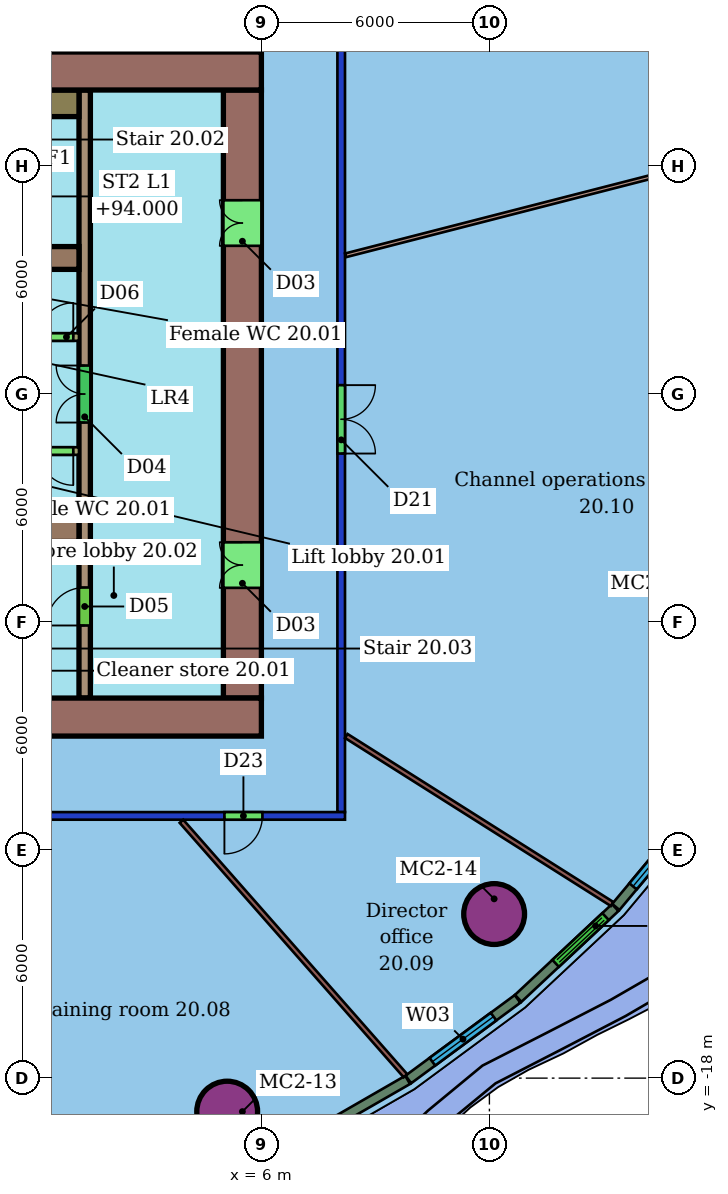
"""IFC4 building model, lengths in metres.
Left out: names, types, materials, properties, quantities, classifications, styles, units other than length and angle.
Written with IfcOpenShell. Run it as: python <this file> out.ifc"""

import sys

from ifc_helpers import new_model, si_unit, direction, frame, frame_2d, origin, origin_2d, place, context, subcontext, project, spatial, rectangle, hollow_circle, extrude, element, fill, save


model = new_model("IFC4")
c1 = context("Model", 3, precision=1e-05, world=origin(), true_north=direction((0.0, 1.0)))
c2 = subcontext(c1, "Body", "Model", "MODEL_VIEW")
j1 = project(units=[si_unit("LENGTHUNIT", "METRE"), si_unit("PLANEANGLEUNIT", "RADIAN")], contexts=[c1])
p1 = place(None, origin())
s1 = spatial("IfcSite", under=j1, at=p1, CompositionType="ELEMENT")
p2 = place(p1, origin())
s2 = spatial("IfcBuilding", under=s1, at=p2, CompositionType="ELEMENT")
p3 = place(p2, frame((0.0, 0.0, 92.2)))
s3 = spatial("IfcBuildingStorey", under=s2, at=p3, CompositionType="ELEMENT", Elevation=92.2)
for number, where, z_axis, x_axis in (
    (1, (5.1, -18.881, 0.0), (0.0, 0.0, 1.0), (1.0, 0.0, 0.0)),
    (2, (12.125, -13.683, 0.0), (0.0, 0.0, 1.0), (1.0, 0.0, 0.0)),
):
    element("IfcColumn", number, at=place(p3, frame(where, z_axis=z_axis, x_axis=x_axis)), inside=s3, PredefinedType="COLUMN", context=c2, shape_type="SweptSolid", body=[
        extrude(hollow_circle(Radius=0.8, WallThickness=0.055, at=origin_2d()), origin(), (0.0, 0.0, 1.0), 3.45),
    ])
p4 = place(p3, frame((8.2, -11.1, 0.0), z_axis=(0.0, 0.0, 1.0), x_axis=(-1.0, 0.0, 0.0)))
e3 = element("IfcWall", 3, at=p4, inside=s3, PredefinedType="PARTITIONING", context=c2, shape_type="SweptSolid", body=[
    extrude(rectangle(XDim=28.4, YDim=0.2, at=frame_2d((14.2, 0.0))), origin(), (0.0, 0.0, 1.0), 3.0),
])
p5 = place(p4, frame((22.418, 0.0, 0.0)))
e4 = element("IfcOpeningElement", 4, at=p5, cuts=e3, PredefinedType="OPENING", context=c2, shape_type="SweptSolid", body=[
    extrude(rectangle(XDim=1.8, YDim=2.1, at=frame_2d((0.9, 1.05))), frame((0.0, 0.11, 0.0), z_axis=(0.0, -1.0, 0.0), x_axis=(1.0, 0.0, 0.0)), (0.0, 0.0, 1.0), 0.22),
])
p6 = place(p4, frame((16.796, 0.0, 0.0)))
e5 = element("IfcOpeningElement", 5, at=p6, cuts=e3, PredefinedType="OPENING", context=c2, shape_type="SweptSolid", body=[
    extrude(rectangle(XDim=1.0, YDim=2.1, at=frame_2d((0.5, 1.05))), frame((0.0, 0.11, 0.0), z_axis=(0.0, -1.0, 0.0), x_axis=(1.0, 0.0, 0.0)), (0.0, 0.0, 1.0), 0.22),
])
p7 = place(p4, frame((8.009, 0.0, 0.0)))
e6 = element("IfcOpeningElement", 6, at=p7, cuts=e3, PredefinedType="OPENING", context=c2, shape_type="SweptSolid", body=[
    extrude(rectangle(XDim=1.5, YDim=2.1, at=frame_2d((0.75, 1.05))), frame((0.0, 0.11, 0.0), z_axis=(0.0, -1.0, 0.0), x_axis=(1.0, 0.0, 0.0)), (0.0, 0.0, 1.0), 0.22),
])
p8 = place(p4, frame((2.173, 0.0, 0.0)))
e7 = element("IfcOpeningElement", 7, at=p8, cuts=e3, PredefinedType="OPENING", context=c2, shape_type="SweptSolid", body=[
    extrude(rectangle(XDim=1.0, YDim=2.4, at=frame_2d((0.5, 1.2))), frame((0.0, 0.11, 0.0), z_axis=(0.0, -1.0, 0.0), x_axis=(1.0, 0.0, 0.0)), (0.0, 0.0, 1.0), 0.22),
])
p9 = place(p3, frame((8.1, 11.0, 0.0), z_axis=(0.0, 0.0, 1.0), x_axis=(0.0, -1.0, 0.0)))
e8 = element("IfcWall", 8, at=p9, inside=s3, PredefinedType="PARTITIONING", context=c2, shape_type="SweptSolid", body=[
    extrude(rectangle(XDim=22.0, YDim=0.2, at=frame_2d((11.0, 0.0))), origin(), (0.0, 0.0, 1.0), 3.0),
])
p10 = place(p9, frame((10.766, 0.0, 0.0)))
e9 = element("IfcOpeningElement", 9, at=p10, cuts=e8, PredefinedType="OPENING", context=c2, shape_type="SweptSolid", body=[
    extrude(rectangle(XDim=1.8, YDim=2.1, at=frame_2d((0.9, 1.05))), frame((0.0, 0.11, 0.0), z_axis=(0.0, -1.0, 0.0), x_axis=(1.0, 0.0, 0.0)), (0.0, 0.0, 1.0), 0.22),
])
p11 = place(p3, frame((21.354, 7.023, 0.0), z_axis=(0.0, 0.0, 1.0), x_axis=(-0.968583888686, -0.248687053499, 0.0)))
e10 = element("IfcWall", 10, at=p11, inside=s3, PredefinedType="PARTITIONING", context=c2, shape_type="SweptSolid", body=[
    extrude(rectangle(XDim=13.567, YDim=0.1, at=frame_2d((6.784, 0.0))), origin(), (0.0, 0.0, 1.0), 3.45),
])
p12 = place(p3, frame((9.79, -17.936, 0.0), z_axis=(0.0, 0.0, 1.0), x_axis=(-0.660747590453, 0.750608167895, 0.0)))
e11 = element("IfcWall", 11, at=p12, inside=s3, PredefinedType="PARTITIONING", context=c2, shape_type="SweptSolid", body=[
    extrude(rectangle(XDim=8.919, YDim=0.125, at=frame_2d((4.46, 0.0))), origin(), (0.0, 0.0, 1.0), 3.45),
])
p13 = place(p3, frame((15.228, -13.418, 0.0), z_axis=(0.0, 0.0, 1.0), x_axis=(-0.845280625948, 0.534322621079, 0.0)))
e12 = element("IfcWall", 12, at=p13, inside=s3, PredefinedType="PARTITIONING", context=c2, shape_type="SweptSolid", body=[
    extrude(rectangle(XDim=8.275, YDim=0.125, at=frame_2d((4.138, 0.0))), origin(), (0.0, 0.0, 1.0), 3.45),
])
p14 = place(p3, frame((6.741, -19.836, 0.0), z_axis=(0.0, 0.0, 1.0), x_axis=(0.866511818646, 0.49915655675, 0.0)))
e13 = element("IfcWall", 13, at=p14, inside=s3, PredefinedType="SOLIDWALL", context=c2, shape_type="SweptSolid", body=[
    extrude(rectangle(XDim=3.586, YDim=0.25, at=frame_2d((1.793, 0.0))), origin(), (0.0, 0.0, 1.0), 3.05),
])
p15 = place(p3, frame((9.867, -18.034, 0.0), z_axis=(0.0, 0.0, 1.0), x_axis=(0.804847820355, 0.593481243234, 0.0)))
e14 = element("IfcWall", 14, at=p15, inside=s3, PredefinedType="SOLIDWALL", context=c2, shape_type="SweptSolid", body=[
    extrude(rectangle(XDim=3.57, YDim=0.25, at=frame_2d((1.785, 0.0))), origin(), (0.0, 0.0, 1.0), 3.05),
])
p16 = place(p15, frame((0.785, 0.0, 0.9)))
e15 = element("IfcOpeningElement", 15, at=p16, cuts=e14, PredefinedType="OPENING", context=c2, shape_type="SweptSolid", body=[
    extrude(rectangle(XDim=2.0, YDim=2.1, at=frame_2d((1.0, 1.05))), frame((0.0, 0.135, 0.0), z_axis=(0.0, -1.0, 0.0), x_axis=(1.0, 0.0, 0.0)), (0.0, 0.0, 1.0), 0.27),
])
p17 = place(p3, frame((12.758, -15.901, 0.0), z_axis=(0.0, 0.0, 1.0), x_axis=(0.730116287539, 0.68332291537, 0.0)))
e16 = element("IfcWall", 16, at=p17, inside=s3, PredefinedType="SOLIDWALL", context=c2, shape_type="SweptSolid", body=[
    extrude(rectangle(XDim=3.496, YDim=0.25, at=frame_2d((1.748, 0.0))), origin(), (0.0, 0.0, 1.0), 3.05),
])
p18 = place(p17, frame((1.348, 0.0, 0.0)))
e17 = element("IfcOpeningElement", 17, at=p18, cuts=e16, PredefinedType="OPENING", context=c2, shape_type="SweptSolid", body=[
    extrude(rectangle(XDim=1.8, YDim=2.4, at=frame_2d((0.9, 1.2))), frame((0.0, 0.135, 0.0), z_axis=(0.0, -1.0, 0.0), x_axis=(1.0, 0.0, 0.0)), (0.0, 0.0, 1.0), 0.27),
])
p19 = place(p3, frame((15.326, -13.495, 0.0), z_axis=(0.0, 0.0, 1.0), x_axis=(0.641415804232, 0.767193434593, 0.0)))
e18 = element("IfcWall", 18, at=p19, inside=s3, PredefinedType="SOLIDWALL", context=c2, shape_type="SweptSolid", body=[
    extrude(rectangle(XDim=3.41, YDim=0.25, at=frame_2d((1.705, 0.0))), origin(), (0.0, 0.0, 1.0), 3.05),
])
p20 = place(p19, frame((0.705, 0.0, 0.9)))
e19 = element("IfcOpeningElement", 19, at=p20, cuts=e18, PredefinedType="OPENING", context=c2, shape_type="SweptSolid", body=[
    extrude(rectangle(XDim=2.0, YDim=2.1, at=frame_2d((1.0, 1.05))), frame((0.0, 0.135, 0.0), z_axis=(0.0, -1.0, 0.0), x_axis=(1.0, 0.0, 0.0)), (0.0, 0.0, 1.0), 0.27),
])
p21 = place(p3, frame((6.0, 8.5, 0.0), z_axis=(0.0, 0.0, 1.0), x_axis=(-1.0, 0.0, 0.0)))
e20 = element("IfcWall", 20, at=p21, inside=s3, PredefinedType="SHEAR", context=c2, shape_type="SweptSolid", body=[
    extrude(rectangle(XDim=12.0, YDim=1.0, at=frame_2d((6.0, 0.0))), origin(), (0.0, 0.0, 1.0), 3.3),
])
p22 = place(p21, frame((5.6, 0.0, 0.0)))
e21 = element("IfcOpeningElement", 21, at=p22, cuts=e20, PredefinedType="OPENING", context=c2, shape_type="SweptSolid", body=[
    extrude(rectangle(XDim=1.2, YDim=2.1, at=frame_2d((0.6, 1.05))), frame((0.0, 0.51, 0.0), z_axis=(0.0, -1.0, 0.0), x_axis=(1.0, 0.0, 0.0)), (0.0, 0.0, 1.0), 1.02),
])
p23 = place(p3, frame((-18.0, -8.5, 0.0), z_axis=(0.0, 0.0, 1.0), x_axis=(1.0, 0.0, 0.0)))
e22 = element("IfcWall", 22, at=p23, inside=s3, PredefinedType="SHEAR", context=c2, shape_type="SweptSolid", body=[
    extrude(rectangle(XDim=24.0, YDim=1.0, at=frame_2d((12.0, 0.0))), origin(), (0.0, 0.0, 1.0), 3.3),
])
p24 = place(p23, frame((6.0, 0.0, 0.0)))
e23 = element("IfcOpeningElement", 23, at=p24, cuts=e22, PredefinedType="OPENING", context=c2, shape_type="SweptSolid", body=[
    extrude(rectangle(XDim=1.2, YDim=2.1, at=frame_2d((0.6, 1.05))), frame((0.0, 0.51, 0.0), z_axis=(0.0, -1.0, 0.0), x_axis=(1.0, 0.0, 0.0)), (0.0, 0.0, 1.0), 1.02),
])
p25 = place(p3, frame((5.5, -8.0, 0.0), z_axis=(0.0, 0.0, 1.0), x_axis=(0.0, 1.0, 0.0)))
e24 = element("IfcWall", 24, at=p25, inside=s3, PredefinedType="SHEAR", context=c2, shape_type="SweptSolid", body=[
    extrude(rectangle(XDim=16.0, YDim=1.0, at=frame_2d((8.0, 0.0))), origin(), (0.0, 0.0, 1.0), 3.3),
])
p26 = place(p25, frame((2.9, 0.0, 0.0)))
e25 = element("IfcOpeningElement", 25, at=p26, cuts=e24, PredefinedType="OPENING", context=c2, shape_type="SweptSolid", body=[
    extrude(rectangle(XDim=1.2, YDim=2.1, at=frame_2d((0.6, 1.05))), frame((0.0, 0.51, 0.0), z_axis=(0.0, -1.0, 0.0), x_axis=(1.0, 0.0, 0.0)), (0.0, 0.0, 1.0), 1.02),
])
p27 = place(p25, frame((11.9, 0.0, 0.0)))
e26 = element("IfcOpeningElement", 26, at=p27, cuts=e24, PredefinedType="OPENING", context=c2, shape_type="SweptSolid", body=[
    extrude(rectangle(XDim=1.2, YDim=2.1, at=frame_2d((0.6, 1.05))), frame((0.0, 0.51, 0.0), z_axis=(0.0, -1.0, 0.0), x_axis=(1.0, 0.0, 0.0)), (0.0, 0.0, 1.0), 1.02),
])
for number, where, z_axis, x_axis in (
    (27, (-6.0, 3.58, 0.0), (0.0, 0.0, 1.0), (1.0, 0.0, 0.0)),
    (28, (-6.0, -3.58, 0.0), (0.0, 0.0, 1.0), (1.0, 0.0, 0.0)),
):
    element("IfcWall", number, at=place(p3, frame(where, z_axis=z_axis, x_axis=x_axis)), inside=s3, PredefinedType="SHEAR", context=c2, shape_type="SweptSolid", body=[
        extrude(rectangle(XDim=7.2, YDim=0.6, at=frame_2d((3.6, 0.0))), origin(), (0.0, 0.0, 1.0), 3.3),
    ])
p28 = place(p3, frame((1.35, -8.0, 0.0), z_axis=(0.0, 0.0, 1.0), x_axis=(0.0, 1.0, 0.0)))
e29 = element("IfcWall", 29, at=p28, inside=s3, PredefinedType="SHEAR", context=c2, shape_type="SweptSolid", body=[
    extrude(rectangle(XDim=16.0, YDim=0.3, at=frame_2d((8.0, 0.0))), origin(), (0.0, 0.0, 1.0), 3.3),
])
p29 = place(p28, frame((1.91, 0.0, 0.0)))
e30 = element("IfcOpeningElement", 30, at=p29, cuts=e29, PredefinedType="OPENING", context=c2, shape_type="SweptSolid", body=[
    extrude(rectangle(XDim=1.0, YDim=2.1, at=frame_2d((0.5, 1.05))), frame((0.0, 0.16, 0.0), z_axis=(0.0, -1.0, 0.0), x_axis=(1.0, 0.0, 0.0)), (0.0, 0.0, 1.0), 0.32),
])
p30 = place(p28, frame((7.25, 0.0, 0.0)))
e31 = element("IfcOpeningElement", 31, at=p30, cuts=e29, PredefinedType="OPENING", context=c2, shape_type="SweptSolid", body=[
    extrude(rectangle(XDim=1.5, YDim=2.1, at=frame_2d((0.75, 1.05))), frame((0.0, 0.16, 0.0), z_axis=(0.0, -1.0, 0.0), x_axis=(1.0, 0.0, 0.0)), (0.0, 0.0, 1.0), 0.32),
])
p31 = place(p3, frame((-13.2, 1.5, 0.0), z_axis=(0.0, 0.0, 1.0), x_axis=(1.0, 0.0, 0.0)))
e32 = element("IfcWall", 32, at=p31, inside=s3, PredefinedType="SHEAR", context=c2, shape_type="SweptSolid", body=[
    extrude(rectangle(XDim=14.4, YDim=0.2, at=frame_2d((7.2, 0.0))), origin(), (0.0, 0.0, 1.0), 3.3),
])
p32 = place(p31, frame((0.546, 0.0, 0.0)))
e33 = element("IfcOpeningElement", 33, at=p32, cuts=e32, PredefinedType="OPENING", context=c2, shape_type="SweptSolid", body=[
    extrude(rectangle(XDim=1.1, YDim=2.1, at=frame_2d((0.55, 1.05))), frame((0.0, 0.11, 0.0), z_axis=(0.0, -1.0, 0.0), x_axis=(1.0, 0.0, 0.0)), (0.0, 0.0, 1.0), 0.22),
])
p33 = place(p31, frame((2.988, 0.0, 0.0)))
e34 = element("IfcOpeningElement", 34, at=p33, cuts=e32, PredefinedType="OPENING", context=c2, shape_type="SweptSolid", body=[
    extrude(rectangle(XDim=1.1, YDim=2.1, at=frame_2d((0.55, 1.05))), frame((0.0, 0.11, 0.0), z_axis=(0.0, -1.0, 0.0), x_axis=(1.0, 0.0, 0.0)), (0.0, 0.0, 1.0), 0.22),
])
p34 = place(p31, frame((5.429, 0.0, 0.0)))
e35 = element("IfcOpeningElement", 35, at=p34, cuts=e32, PredefinedType="OPENING", context=c2, shape_type="SweptSolid", body=[
    extrude(rectangle(XDim=1.1, YDim=2.1, at=frame_2d((0.55, 1.05))), frame((0.0, 0.11, 0.0), z_axis=(0.0, -1.0, 0.0), x_axis=(1.0, 0.0, 0.0)), (0.0, 0.0, 1.0), 0.22),
])
p35 = place(p31, frame((7.871, 0.0, 0.0)))
e36 = element("IfcOpeningElement", 36, at=p35, cuts=e32, PredefinedType="OPENING", context=c2, shape_type="SweptSolid", body=[
    extrude(rectangle(XDim=1.1, YDim=2.1, at=frame_2d((0.55, 1.05))), frame((0.0, 0.11, 0.0), z_axis=(0.0, -1.0, 0.0), x_axis=(1.0, 0.0, 0.0)), (0.0, 0.0, 1.0), 0.22),
])
p36 = place(p31, frame((10.21, 0.0, 0.0)))
e37 = element("IfcOpeningElement", 37, at=p36, cuts=e32, PredefinedType="OPENING", context=c2, shape_type="SweptSolid", body=[
    extrude(rectangle(XDim=1.0, YDim=2.1, at=frame_2d((0.5, 1.05))), frame((0.0, 0.11, 0.0), z_axis=(0.0, -1.0, 0.0), x_axis=(1.0, 0.0, 0.0)), (0.0, 0.0, 1.0), 0.22),
])
p37 = place(p31, frame((13.35, 0.0, 0.0)))
e38 = element("IfcOpeningElement", 38, at=p37, cuts=e32, PredefinedType="OPENING", context=c2, shape_type="SweptSolid", body=[
    extrude(rectangle(XDim=0.9, YDim=2.1, at=frame_2d((0.45, 1.05))), frame((0.0, 0.11, 0.0), z_axis=(0.0, -1.0, 0.0), x_axis=(1.0, 0.0, 0.0)), (0.0, 0.0, 1.0), 0.22),
])
p38 = place(p3, frame((1.2, -1.5, 0.0), z_axis=(0.0, 0.0, 1.0), x_axis=(-1.0, 0.0, 0.0)))
e39 = element("IfcWall", 39, at=p38, inside=s3, PredefinedType="SHEAR", context=c2, shape_type="SweptSolid", body=[
    extrude(rectangle(XDim=14.4, YDim=0.2, at=frame_2d((7.2, 0.0))), origin(), (0.0, 0.0, 1.0), 3.3),
])
p39 = place(p38, frame((7.821, 0.0, 0.0)))
e40 = element("IfcOpeningElement", 40, at=p39, cuts=e39, PredefinedType="OPENING", context=c2, shape_type="SweptSolid", body=[
    extrude(rectangle(XDim=1.2, YDim=2.1, at=frame_2d((0.6, 1.05))), frame((0.0, 0.11, 0.0), z_axis=(0.0, -1.0, 0.0), x_axis=(1.0, 0.0, 0.0)), (0.0, 0.0, 1.0), 0.22),
])
p40 = place(p38, frame((0.15, 0.0, 0.0)))
e41 = element("IfcOpeningElement", 41, at=p40, cuts=e39, PredefinedType="OPENING", context=c2, shape_type="SweptSolid", body=[
    extrude(rectangle(XDim=0.9, YDim=2.1, at=frame_2d((0.45, 1.05))), frame((0.0, 0.11, 0.0), z_axis=(0.0, -1.0, 0.0), x_axis=(1.0, 0.0, 0.0)), (0.0, 0.0, 1.0), 0.22),
])
p41 = place(p3, frame((0.4, 7.65, 0.0), z_axis=(0.0, 0.0, 1.0), x_axis=(1.0, 0.0, 0.0)))
e42 = element("IfcWall", 42, at=p41, inside=s3, PredefinedType="SHEAR", context=c2, shape_type="SweptSolid", body=[
    extrude(rectangle(XDim=0.8, YDim=0.7, at=frame_2d((0.4, 0.0))), origin(), (0.0, 0.0, 1.0), 3.3),
])
p42 = place(p8, origin())
e43 = element("IfcDoor", 43, at=p42, inside=s3, OperationType="SINGLE_SWING_RIGHT", PredefinedType="DOOR", context=c2, shape_type="SweptSolid", body=[
    extrude(rectangle(XDim=1.0, YDim=2.4, at=frame_2d((0.5, 1.2))), frame((0.0, 0.025, 0.0), z_axis=(0.0, -1.0, 0.0), x_axis=(1.0, 0.0, 0.0)), (0.0, 0.0, 1.0), 0.05),
])
fill(e7, e43)
p43 = place(p10, origin())
e44 = element("IfcDoor", 44, at=p43, inside=s3, OperationType="DOUBLE_DOOR_SINGLE_SWING", PredefinedType="DOOR", context=c2, shape_type="SweptSolid", body=[
    extrude(rectangle(XDim=1.8, YDim=2.1, at=frame_2d((0.9, 1.05))), frame((0.0, 0.025, 0.0), z_axis=(0.0, -1.0, 0.0), x_axis=(1.0, 0.0, 0.0)), (0.0, 0.0, 1.0), 0.05),
])
fill(e9, e44)
p44 = place(p16, origin())
e45 = element("IfcWindow", 45, at=p44, inside=s3, PartitioningType="SINGLE_PANEL", PredefinedType="WINDOW", context=c2, shape_type="SweptSolid", body=[
    extrude(rectangle(XDim=2.0, YDim=2.1, at=frame_2d((1.0, 1.05))), frame((0.0, 0.03, 0.0), z_axis=(0.0, -1.0, 0.0), x_axis=(1.0, 0.0, 0.0)), (0.0, 0.0, 1.0), 0.06),
])
fill(e15, e45)
p45 = place(p18, origin())
e46 = element("IfcDoor", 46, at=p45, inside=s3, OperationType="DOUBLE_DOOR_SLIDING", PredefinedType="DOOR", context=c2, shape_type="SweptSolid", body=[
    extrude(rectangle(XDim=1.8, YDim=2.4, at=frame_2d((0.9, 1.2))), frame((0.0, 0.025, 0.0), z_axis=(0.0, -1.0, 0.0), x_axis=(1.0, 0.0, 0.0)), (0.0, 0.0, 1.0), 0.05),
])
fill(e17, e46)
p46 = place(p20, origin())
e47 = element("IfcWindow", 47, at=p46, inside=s3, PartitioningType="SINGLE_PANEL", PredefinedType="WINDOW", context=c2, shape_type="SweptSolid", body=[
    extrude(rectangle(XDim=2.0, YDim=2.1, at=frame_2d((1.0, 1.05))), frame((0.0, 0.03, 0.0), z_axis=(0.0, -1.0, 0.0), x_axis=(1.0, 0.0, 0.0)), (0.0, 0.0, 1.0), 0.06),
])
fill(e19, e47)
p47 = place(p26, origin())
e48 = element("IfcDoor", 48, at=p47, inside=s3, OperationType="DOUBLE_DOOR_SINGLE_SWING", PredefinedType="NOTDEFINED", context=c2, shape_type="SweptSolid", body=[
    extrude(rectangle(XDim=1.2, YDim=2.1, at=frame_2d((0.6, 1.05))), frame((0.0, 0.025, 0.0), z_axis=(0.0, -1.0, 0.0), x_axis=(1.0, 0.0, 0.0)), (0.0, 0.0, 1.0), 0.05),
])
fill(e25, e48)
p48 = place(p27, origin())
e49 = element("IfcDoor", 49, at=p48, inside=s3, OperationType="DOUBLE_DOOR_SINGLE_SWING", PredefinedType="NOTDEFINED", context=c2, shape_type="SweptSolid", body=[
    extrude(rectangle(XDim=1.2, YDim=2.1, at=frame_2d((0.6, 1.05))), frame((0.0, 0.025, 0.0), z_axis=(0.0, -1.0, 0.0), x_axis=(1.0, 0.0, 0.0)), (0.0, 0.0, 1.0), 0.05),
])
fill(e26, e49)
p49 = place(p29, origin())
e50 = element("IfcDoor", 50, at=p49, inside=s3, OperationType="SINGLE_SWING_LEFT", PredefinedType="NOTDEFINED", context=c2, shape_type="SweptSolid", body=[
    extrude(rectangle(XDim=1.0, YDim=2.1, at=frame_2d((0.5, 1.05))), frame((0.0, 0.025, 0.0), z_axis=(0.0, -1.0, 0.0), x_axis=(1.0, 0.0, 0.0)), (0.0, 0.0, 1.0), 0.05),
])
fill(e30, e50)
p50 = place(p30, origin())
e51 = element("IfcDoor", 51, at=p50, inside=s3, OperationType="DOUBLE_DOOR_SINGLE_SWING", PredefinedType="NOTDEFINED", context=c2, shape_type="SweptSolid", body=[
    extrude(rectangle(XDim=1.5, YDim=2.1, at=frame_2d((0.75, 1.05))), frame((0.0, 0.025, 0.0), z_axis=(0.0, -1.0, 0.0), x_axis=(1.0, 0.0, 0.0)), (0.0, 0.0, 1.0), 0.05),
])
fill(e31, e51)
p51 = place(p37, origin())
e52 = element("IfcDoor", 52, at=p51, inside=s3, OperationType="SINGLE_SWING_RIGHT", PredefinedType="NOTDEFINED", context=c2, shape_type="SweptSolid", body=[
    extrude(rectangle(XDim=0.9, YDim=2.1, at=frame_2d((0.45, 1.05))), frame((0.0, 0.025, 0.0), z_axis=(0.0, -1.0, 0.0), x_axis=(1.0, 0.0, 0.0)), (0.0, 0.0, 1.0), 0.05),
])
fill(e38, e52)
p52 = place(p40, origin())
e53 = element("IfcDoor", 53, at=p52, inside=s3, OperationType="SINGLE_SWING_LEFT", PredefinedType="NOTDEFINED", context=c2, shape_type="SweptSolid", body=[
    extrude(rectangle(XDim=0.9, YDim=2.1, at=frame_2d((0.45, 1.05))), frame((0.0, 0.025, 0.0), z_axis=(0.0, -1.0, 0.0), x_axis=(1.0, 0.0, 0.0)), (0.0, 0.0, 1.0), 0.05),
])
fill(e41, e53)
save(model, sys.argv[1])
